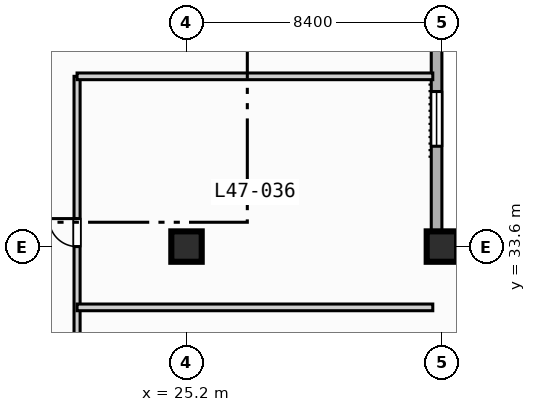
"""IFC4 building model, lengths in metres.
Left out: names, types, materials, properties, quantities, classifications, styles, units other than length and angle.
Written with IfcOpenShell. Run it as: python <this file> out.ifc"""

import sys

from ifc_helpers import new_model, si_unit, direction, frame, frame_2d, origin, origin_2d, place, context, subcontext, project, spatial, rectangle, extrude, element, fill, save


model = new_model("IFC4")
c1 = context("Model", 3, precision=1e-05, world=origin(), true_north=direction((0.0, 1.0)))
c2 = subcontext(c1, "Body", "Model", "MODEL_VIEW")
j1 = project(units=[si_unit("LENGTHUNIT", "METRE"), si_unit("PLANEANGLEUNIT", "RADIAN")], contexts=[c1])
p1 = place(None, origin())
s1 = spatial("IfcSite", under=j1, at=p1, CompositionType="ELEMENT")
p2 = place(p1, origin())
s2 = spatial("IfcBuilding", under=s1, at=p2, CompositionType="ELEMENT")
p3 = place(p2, frame((0.0, 0.0, 193.9)))
s3 = spatial("IfcBuildingStorey", under=s2, at=p3, CompositionType="ELEMENT", Elevation=193.9)
for number, where, z_axis, x_axis in (
    (1, (25.2, 33.6, 0.0), (0.0, 0.0, 1.0), (1.0, 0.0, 0.0)),
    (2, (33.6, 33.6, 0.0), (0.0, 0.0, 1.0), (1.0, 0.0, 0.0)),
):
    element("IfcColumn", number, at=place(p3, frame(where, z_axis=z_axis, x_axis=x_axis)), inside=s3, PredefinedType="COLUMN", context=c2, shape_type="SweptSolid", body=[
        extrude(rectangle(XDim=1.0, YDim=1.0, at=origin_2d()), origin(), (0.0, 0.0, 1.0), 3.7),
    ])
p4 = place(p3, frame((33.425, 72.425, 0.0), z_axis=(0.0, 0.0, 1.0), x_axis=(0.0, -1.0, 0.0)))
e3 = element("IfcWall", 3, at=p4, inside=s3, PredefinedType="STANDARD", context=c2, shape_type="SweptSolid", body=[
    extrude(rectangle(XDim=39.0, YDim=0.35, at=frame_2d((19.5, 0.0))), origin(), (0.0, 0.0, 1.0), 3.47),
])
p5 = place(p4, frame((33.725, 0.0, 0.85)))
e4 = element("IfcOpeningElement", 4, at=p5, cuts=e3, PredefinedType="OPENING", context=c2, shape_type="SweptSolid", body=[
    extrude(rectangle(XDim=1.8, YDim=1.8, at=frame_2d((0.9, 0.9))), frame((0.0, 0.185, 0.0), z_axis=(0.0, -1.0, 0.0), x_axis=(1.0, 0.0, 0.0)), (0.0, 0.0, 1.0), 0.37),
])
p6 = place(p4, frame((16.925, 0.0, 0.85)))
e5 = element("IfcOpeningElement", 5, at=p6, cuts=e3, PredefinedType="OPENING", context=c2, shape_type="SweptSolid", body=[
    extrude(rectangle(XDim=1.8, YDim=1.8, at=frame_2d((0.9, 0.9))), frame((0.0, 0.185, 0.0), z_axis=(0.0, -1.0, 0.0), x_axis=(1.0, 0.0, 0.0)), (0.0, 0.0, 1.0), 0.37),
])
p7 = place(p4, frame((8.225, 0.0, 0.85)))
e6 = element("IfcOpeningElement", 6, at=p7, cuts=e3, PredefinedType="OPENING", context=c2, shape_type="SweptSolid", body=[
    extrude(rectangle(XDim=2.4, YDim=1.95, at=frame_2d((1.2, 0.975))), frame((0.0, 0.185, 0.0), z_axis=(0.0, -1.0, 0.0), x_axis=(1.0, 0.0, 0.0)), (0.0, 0.0, 1.0), 0.37),
])
p8 = place(p3, frame((33.425, 33.425, 0.0), z_axis=(0.0, 0.0, 1.0), x_axis=(1.0, 0.0, 0.0)))
e7 = element("IfcWall", 7, at=p8, inside=s3, PredefinedType="STANDARD", context=c2, shape_type="SweptSolid", body=[
    extrude(rectangle(XDim=39.0, YDim=0.35, at=frame_2d((19.5, 0.0))), origin(), (0.0, 0.0, 1.0), 3.47),
])
p9 = place(p8, frame((12.075, 0.0, 0.0)))
e8 = element("IfcOpeningElement", 8, at=p9, cuts=e7, PredefinedType="OPENING", context=c2, shape_type="SweptSolid", body=[
    extrude(rectangle(XDim=1.4, YDim=2.2, at=frame_2d((0.7, 1.1))), frame((0.0, 0.185, 0.0), z_axis=(0.0, -1.0, 0.0), x_axis=(1.0, 0.0, 0.0)), (0.0, 0.0, 1.0), 0.37),
])
p10 = place(p3, frame((21.6, 24.2, 0.0), z_axis=(0.0, 0.0, 1.0), x_axis=(0.0, 1.0, 0.0)))
e9 = element("IfcWall", 9, at=p10, inside=s3, PredefinedType="PARTITIONING", context=c2, shape_type="SweptSolid", body=[
    extrude(rectangle(XDim=15.0, YDim=0.2, at=frame_2d((7.5, 0.0))), origin(), (0.0, 0.0, 1.0), 3.47),
])
p11 = place(p10, frame((2.0, 0.0, 0.0)))
e10 = element("IfcOpeningElement", 10, at=p11, cuts=e9, PredefinedType="OPENING", context=c2, shape_type="SweptSolid", body=[
    extrude(rectangle(XDim=0.92, YDim=2.1, at=frame_2d((0.46, 1.05))), frame((0.0, 0.11, 0.0), z_axis=(0.0, -1.0, 0.0), x_axis=(1.0, 0.0, 0.0)), (0.0, 0.0, 1.0), 0.22),
])
p12 = place(p10, frame((9.4, 0.0, 0.0)))
e11 = element("IfcOpeningElement", 11, at=p12, cuts=e9, PredefinedType="OPENING", context=c2, shape_type="SweptSolid", body=[
    extrude(rectangle(XDim=0.92, YDim=2.1, at=frame_2d((0.46, 1.05))), frame((0.0, 0.11, 0.0), z_axis=(0.0, -1.0, 0.0), x_axis=(1.0, 0.0, 0.0)), (0.0, 0.0, 1.0), 0.22),
])
for number, where, z_axis, x_axis in (
    (12, (21.6, 31.6, 0.0), (0.0, 0.0, 1.0), (1.0, 0.0, 0.0)),
    (13, (21.6, 39.2, 0.0), (0.0, 0.0, 1.0), (1.0, 0.0, 0.0)),
):
    element("IfcWall", number, at=place(p3, frame(where, z_axis=z_axis, x_axis=x_axis)), inside=s3, PredefinedType="PARTITIONING", context=c2, shape_type="SweptSolid", body=[
        extrude(rectangle(XDim=11.7, YDim=0.22, at=frame_2d((5.85, 0.0))), origin(), (0.0, 0.0, 1.0), 3.47),
    ])
p13 = place(p5, origin())
e14 = element("IfcWindow", 14, at=p13, inside=s3, PartitioningType="SINGLE_PANEL", PredefinedType="WINDOW", context=c2, shape_type="SweptSolid", body=[
    extrude(rectangle(XDim=1.8, YDim=1.8, at=frame_2d((0.9, 0.9))), frame((0.0, 0.03, 0.0), z_axis=(0.0, -1.0, 0.0), x_axis=(1.0, 0.0, 0.0)), (0.0, 0.0, 1.0), 0.06),
])
fill(e4, e14)
p14 = place(p12, origin())
e15 = element("IfcDoor", 15, at=p14, inside=s3, OperationType="SINGLE_SWING_RIGHT", PredefinedType="DOOR", context=c2, shape_type="SweptSolid", body=[
    extrude(rectangle(XDim=0.92, YDim=2.1, at=frame_2d((0.46, 1.05))), frame((0.0, 0.025, 0.0), z_axis=(0.0, -1.0, 0.0), x_axis=(1.0, 0.0, 0.0)), (0.0, 0.0, 1.0), 0.05),
])
fill(e11, e15)
save(model, sys.argv[1])
